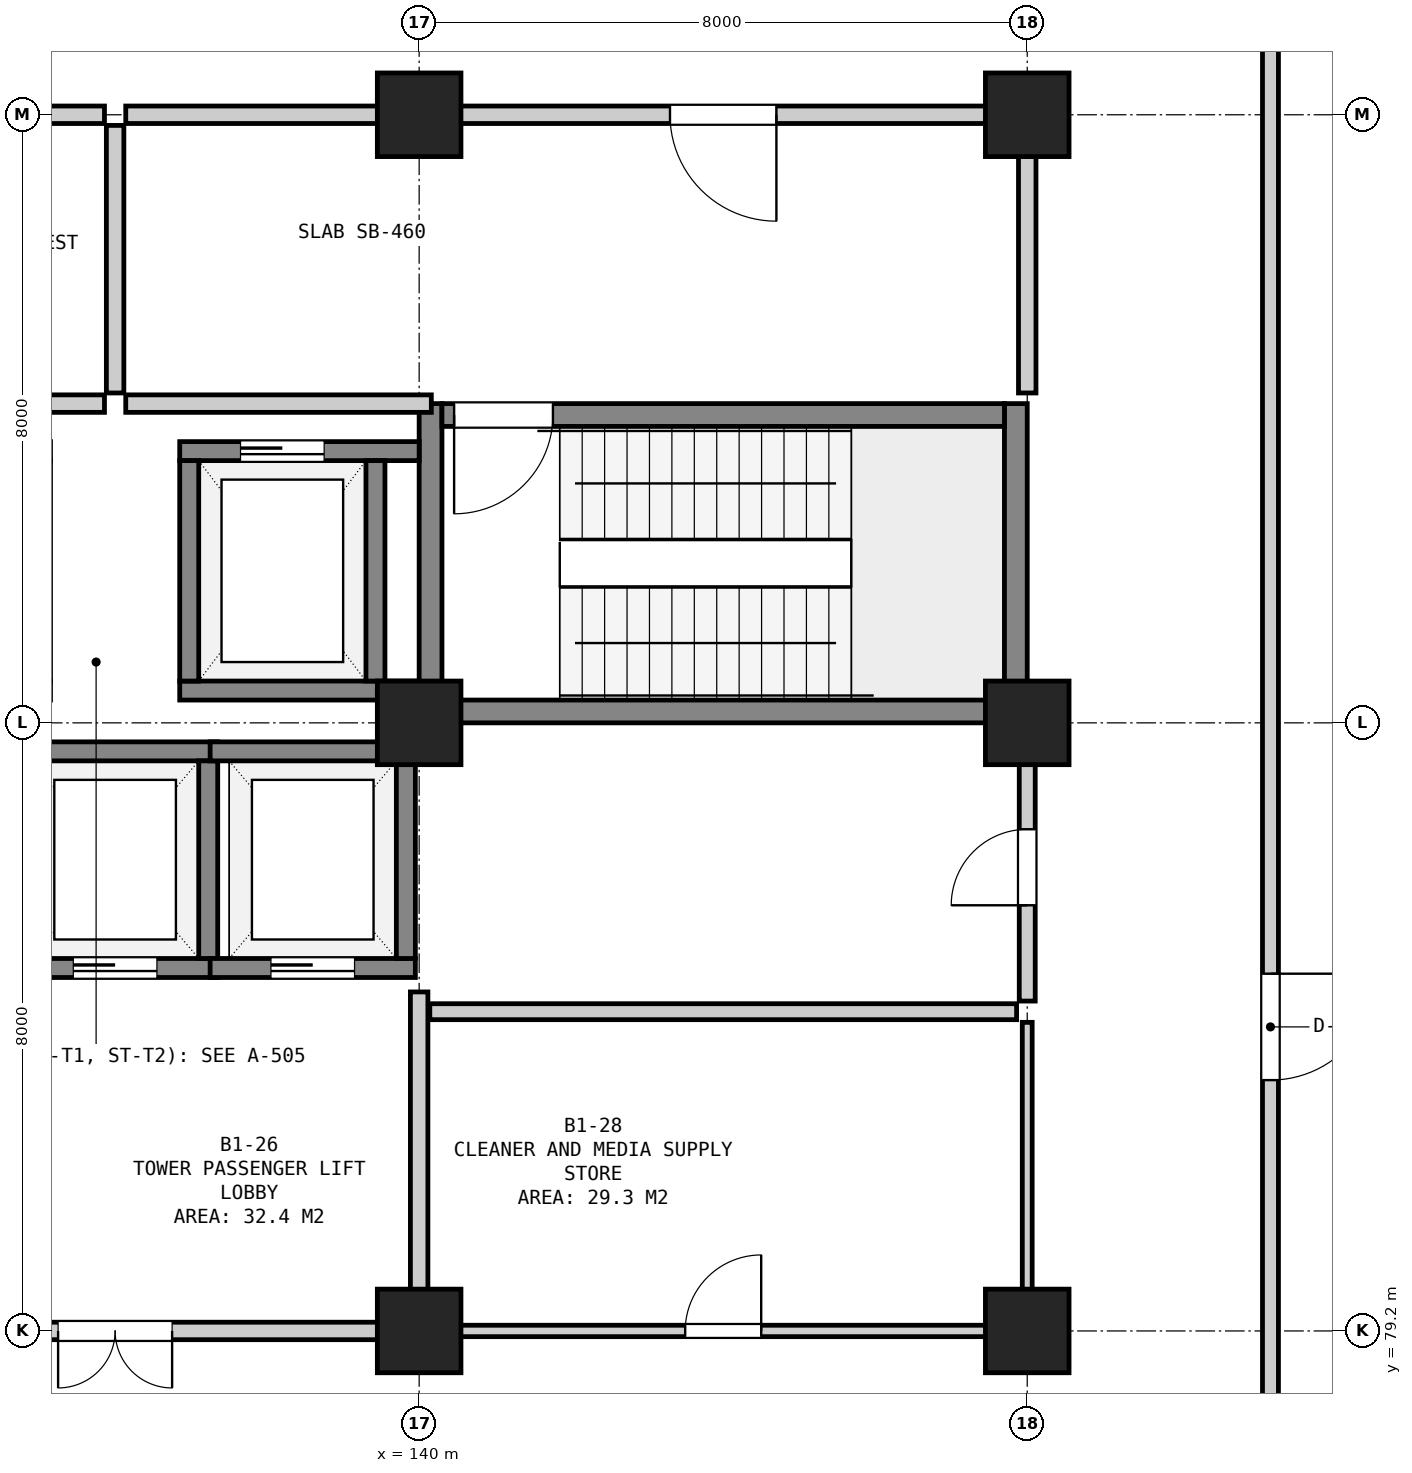
"""IFC4 building model, lengths in metres.
Left out: names, types, materials, properties, quantities, classifications, styles, units other than length and angle.
Written with IfcOpenShell. Run it as: python <this file> out.ifc"""

import sys

from ifc_helpers import new_model, si_unit, direction, frame, frame_2d, origin, origin_2d, place, context, subcontext, project, spatial, rectangle, extrude, element, fill, save


model = new_model("IFC4")
c1 = context("Model", 3, precision=1e-05, world=origin(), true_north=direction((0.0, 1.0)))
c2 = subcontext(c1, "Body", "Model", "MODEL_VIEW")
j1 = project(units=[si_unit("LENGTHUNIT", "METRE"), si_unit("PLANEANGLEUNIT", "RADIAN")], contexts=[c1])
p1 = place(None, origin())
s1 = spatial("IfcSite", under=j1, at=p1, CompositionType="ELEMENT")
p2 = place(p1, origin())
s2 = spatial("IfcBuilding", under=s1, at=p2, CompositionType="ELEMENT")
p3 = place(p2, frame((0.0, 0.0, -4.5)))
s3 = spatial("IfcBuildingStorey", under=s2, at=p3, CompositionType="ELEMENT", Elevation=-4.5)
for number, where, z_axis, x_axis in (
    (1, (140.0, 79.2, 0.0), (0.0, 0.0, 1.0), (1.0, 0.0, 0.0)),
    (2, (140.0, 87.2, 0.0), (0.0, 0.0, 1.0), (1.0, 0.0, 0.0)),
    (3, (140.0, 95.2, 0.0), (0.0, 0.0, 1.0), (1.0, 0.0, 0.0)),
    (4, (148.0, 79.2, 0.0), (0.0, 0.0, 1.0), (1.0, 0.0, 0.0)),
    (5, (148.0, 87.2, 0.0), (0.0, 0.0, 1.0), (1.0, 0.0, 0.0)),
    (6, (148.0, 95.2, 0.0), (0.0, 0.0, 1.0), (1.0, 0.0, 0.0)),
):
    element("IfcColumn", number, at=place(p3, frame(where, z_axis=z_axis, x_axis=x_axis)), inside=s3, PredefinedType="COLUMN", context=c2, shape_type="SweptSolid", body=[
        extrude(rectangle(XDim=1.1, YDim=1.1, at=origin_2d()), origin(), (0.0, 0.0, 1.0), 4.5),
    ])
for number, where, z_axis, x_axis in (
    (7, (140.15, 87.2, 0.0), (0.0, 0.0, 1.0), (0.0, 1.0, 0.0)),
    (8, (147.85, 87.2, 0.0), (0.0, 0.0, 1.0), (0.0, 1.0, 0.0)),
):
    element("IfcWall", number, at=place(p3, frame(where, z_axis=z_axis, x_axis=x_axis)), inside=s3, PredefinedType="SHEAR", context=c2, shape_type="SweptSolid", body=[
        extrude(rectangle(XDim=4.2, YDim=0.3, at=frame_2d((2.1, 0.0))), origin(), (0.0, 0.0, 1.0), 4.08),
    ])
p4 = place(p3, frame((140.3, 87.35, 0.0), z_axis=(0.0, 0.0, 1.0), x_axis=(1.0, 0.0, 0.0)))
e9 = element("IfcWall", 9, at=p4, inside=s3, PredefinedType="SHEAR", context=c2, shape_type="SweptSolid", body=[
    extrude(rectangle(XDim=7.4, YDim=0.3, at=frame_2d((3.7, 0.0))), origin(), (0.0, 0.0, 1.0), 4.08),
])
p5 = place(p3, frame((140.3, 91.25, 0.0), z_axis=(0.0, 0.0, 1.0), x_axis=(1.0, 0.0, 0.0)))
e10 = element("IfcWall", 10, at=p5, inside=s3, PredefinedType="SHEAR", context=c2, shape_type="SweptSolid", body=[
    extrude(rectangle(XDim=7.4, YDim=0.3, at=frame_2d((3.7, 0.0))), origin(), (0.0, 0.0, 1.0), 4.08),
])
p6 = place(p5, frame((0.16, 0.0, 0.0)))
e11 = element("IfcOpeningElement", 11, at=p6, cuts=e10, PredefinedType="OPENING", context=c2, shape_type="SweptSolid", body=[
    extrude(rectangle(XDim=1.3, YDim=2.18, at=frame_2d((0.65, 1.09))), frame((0.0, 0.162, 0.0), z_axis=(0.0, -1.0, 0.0), x_axis=(1.0, 0.0, 0.0)), (0.0, 0.0, 1.0), 0.324),
])
p7 = place(p3, frame((136.85, 87.625, 0.0), z_axis=(0.0, 0.0, 1.0), x_axis=(1.0, 0.0, 0.0)))
e12 = element("IfcWall", 12, at=p7, inside=s3, PredefinedType="SHEAR", context=c2, shape_type="SweptSolid", body=[
    extrude(rectangle(XDim=3.15, YDim=0.25, at=frame_2d((1.575, 0.0))), origin(), (0.0, 0.0, 1.0), 4.08),
])
p8 = place(p3, frame((136.85, 90.775, 0.0), z_axis=(0.0, 0.0, 1.0), x_axis=(1.0, 0.0, 0.0)))
e13 = element("IfcWall", 13, at=p8, inside=s3, PredefinedType="SHEAR", context=c2, shape_type="SweptSolid", body=[
    extrude(rectangle(XDim=3.15, YDim=0.25, at=frame_2d((1.575, 0.0))), origin(), (0.0, 0.0, 1.0), 4.08),
])
p9 = place(p8, frame((0.8, 0.0, 0.0)))
e14 = element("IfcOpeningElement", 14, at=p9, cuts=e13, PredefinedType="OPENING", context=c2, shape_type="SweptSolid", body=[
    extrude(rectangle(XDim=1.1, YDim=2.15, at=frame_2d((0.55, 1.075))), frame((0.0, 0.137, 0.0), z_axis=(0.0, -1.0, 0.0), x_axis=(1.0, 0.0, 0.0)), (0.0, 0.0, 1.0), 0.274),
])
for number, where, z_axis, x_axis in (
    (15, (136.975, 87.75, 0.0), (0.0, 0.0, 1.0), (0.0, 1.0, 0.0)),
    (16, (139.425, 87.75, 0.0), (0.0, 0.0, 1.0), (0.0, 1.0, 0.0)),
):
    element("IfcWall", number, at=place(p3, frame(where, z_axis=z_axis, x_axis=x_axis)), inside=s3, PredefinedType="SHEAR", context=c2, shape_type="SweptSolid", body=[
        extrude(rectangle(XDim=2.9, YDim=0.25, at=frame_2d((1.45, 0.0))), origin(), (0.0, 0.0, 1.0), 4.08),
    ])
p10 = place(p3, frame((134.65, 83.975, 0.0), z_axis=(0.0, 0.0, 1.0), x_axis=(1.0, 0.0, 0.0)))
e17 = element("IfcWall", 17, at=p10, inside=s3, PredefinedType="SHEAR", context=c2, shape_type="SweptSolid", body=[
    extrude(rectangle(XDim=2.7, YDim=0.25, at=frame_2d((1.35, 0.0))), origin(), (0.0, 0.0, 1.0), 4.08),
])
p11 = place(p10, frame((0.8, 0.0, 0.0)))
e18 = element("IfcOpeningElement", 18, at=p11, cuts=e17, PredefinedType="OPENING", context=c2, shape_type="SweptSolid", body=[
    extrude(rectangle(XDim=1.1, YDim=2.15, at=frame_2d((0.55, 1.075))), frame((0.0, 0.137, 0.0), z_axis=(0.0, -1.0, 0.0), x_axis=(1.0, 0.0, 0.0)), (0.0, 0.0, 1.0), 0.274),
])
p12 = place(p3, frame((134.65, 86.825, 0.0), z_axis=(0.0, 0.0, 1.0), x_axis=(1.0, 0.0, 0.0)))
e19 = element("IfcWall", 19, at=p12, inside=s3, PredefinedType="SHEAR", context=c2, shape_type="SweptSolid", body=[
    extrude(rectangle(XDim=2.7, YDim=0.25, at=frame_2d((1.35, 0.0))), origin(), (0.0, 0.0, 1.0), 4.08),
])
p13 = place(p3, frame((137.225, 84.1, 0.0), z_axis=(0.0, 0.0, 1.0), x_axis=(0.0, 1.0, 0.0)))
e20 = element("IfcWall", 20, at=p13, inside=s3, PredefinedType="SHEAR", context=c2, shape_type="SweptSolid", body=[
    extrude(rectangle(XDim=2.6, YDim=0.25, at=frame_2d((1.3, 0.0))), origin(), (0.0, 0.0, 1.0), 4.08),
])
p14 = place(p3, frame((137.25, 83.975, 0.0), z_axis=(0.0, 0.0, 1.0), x_axis=(1.0, 0.0, 0.0)))
e21 = element("IfcWall", 21, at=p14, inside=s3, PredefinedType="SHEAR", context=c2, shape_type="SweptSolid", body=[
    extrude(rectangle(XDim=2.7, YDim=0.25, at=frame_2d((1.35, 0.0))), origin(), (0.0, 0.0, 1.0), 4.08),
])
p15 = place(p14, frame((0.8, 0.0, 0.0)))
e22 = element("IfcOpeningElement", 22, at=p15, cuts=e21, PredefinedType="OPENING", context=c2, shape_type="SweptSolid", body=[
    extrude(rectangle(XDim=1.1, YDim=2.15, at=frame_2d((0.55, 1.075))), frame((0.0, 0.137, 0.0), z_axis=(0.0, -1.0, 0.0), x_axis=(1.0, 0.0, 0.0)), (0.0, 0.0, 1.0), 0.274),
])
p16 = place(p3, frame((137.25, 86.825, 0.0), z_axis=(0.0, 0.0, 1.0), x_axis=(1.0, 0.0, 0.0)))
e23 = element("IfcWall", 23, at=p16, inside=s3, PredefinedType="SHEAR", context=c2, shape_type="SweptSolid", body=[
    extrude(rectangle(XDim=2.7, YDim=0.25, at=frame_2d((1.35, 0.0))), origin(), (0.0, 0.0, 1.0), 4.08),
])
p17 = place(p3, frame((139.825, 84.1, 0.0), z_axis=(0.0, 0.0, 1.0), x_axis=(0.0, 1.0, 0.0)))
e24 = element("IfcWall", 24, at=p17, inside=s3, PredefinedType="SHEAR", context=c2, shape_type="SweptSolid", body=[
    extrude(rectangle(XDim=2.6, YDim=0.25, at=frame_2d((1.3, 0.0))), origin(), (0.0, 0.0, 1.0), 4.08),
])
p18 = place(p3, frame((131.84, 91.4, 0.0), z_axis=(0.0, 0.0, 1.0), x_axis=(1.0, 0.0, 0.0)))
e25 = element("IfcWall", 25, at=p18, inside=s3, PredefinedType="SOLIDWALL", context=c2, shape_type="SweptSolid", body=[
    extrude(rectangle(XDim=4.02, YDim=0.23, at=frame_2d((2.01, 0.0))), origin(), (0.0, 0.0, 1.0), 4.08),
])
p19 = place(p3, frame((124.14, 95.2, 0.0), z_axis=(0.0, 0.0, 1.0), x_axis=(1.0, 0.0, 0.0)))
e26 = element("IfcWall", 26, at=p19, inside=s3, PredefinedType="SOLIDWALL", context=c2, shape_type="SweptSolid", body=[
    extrude(rectangle(XDim=11.72, YDim=0.23, at=frame_2d((5.86, 0.0))), origin(), (0.0, 0.0, 1.0), 3.475),
])
p20 = place(p19, frame((3.16, 0.0, 0.0)))
e27 = element("IfcOpeningElement", 27, at=p20, cuts=e26, PredefinedType="OPENING", context=c2, shape_type="SweptSolid", body=[
    extrude(rectangle(XDim=1.4, YDim=2.2, at=frame_2d((0.7, 1.1))), frame((0.0, 0.127, 0.0), z_axis=(0.0, -1.0, 0.0), x_axis=(1.0, 0.0, 0.0)), (0.0, 0.0, 1.0), 0.254),
])
p21 = place(p3, frame((136.0, 91.54, 0.0), z_axis=(0.0, 0.0, 1.0), x_axis=(0.0, 1.0, 0.0)))
e28 = element("IfcWall", 28, at=p21, inside=s3, PredefinedType="SOLIDWALL", context=c2, shape_type="SweptSolid", body=[
    extrude(rectangle(XDim=3.52, YDim=0.23, at=frame_2d((1.76, 0.0))), origin(), (0.0, 0.0, 1.0), 4.08),
])
p22 = place(p3, frame((136.14, 91.4, 0.0), z_axis=(0.0, 0.0, 1.0), x_axis=(1.0, 0.0, 0.0)))
e29 = element("IfcWall", 29, at=p22, inside=s3, PredefinedType="SOLIDWALL", context=c2, shape_type="SweptSolid", body=[
    extrude(rectangle(XDim=4.02, YDim=0.23, at=frame_2d((2.01, 0.0))), origin(), (0.0, 0.0, 1.0), 4.08),
])
p23 = place(p3, frame((136.14, 95.2, 0.0), z_axis=(0.0, 0.0, 1.0), x_axis=(1.0, 0.0, 0.0)))
e30 = element("IfcWall", 30, at=p23, inside=s3, PredefinedType="SOLIDWALL", context=c2, shape_type="SweptSolid", body=[
    extrude(rectangle(XDim=11.72, YDim=0.23, at=frame_2d((5.86, 0.0))), origin(), (0.0, 0.0, 1.0), 3.475),
])
p24 = place(p23, frame((7.16, 0.0, 0.0)))
e31 = element("IfcOpeningElement", 31, at=p24, cuts=e30, PredefinedType="OPENING", context=c2, shape_type="SweptSolid", body=[
    extrude(rectangle(XDim=1.4, YDim=2.2, at=frame_2d((0.7, 1.1))), frame((0.0, 0.127, 0.0), z_axis=(0.0, -1.0, 0.0), x_axis=(1.0, 0.0, 0.0)), (0.0, 0.0, 1.0), 0.254),
])
p25 = place(p3, frame((148.0, 91.54, 0.0), z_axis=(0.0, 0.0, 1.0), x_axis=(0.0, 1.0, 0.0)))
e32 = element("IfcWall", 32, at=p25, inside=s3, PredefinedType="SOLIDWALL", context=c2, shape_type="SweptSolid", body=[
    extrude(rectangle(XDim=3.52, YDim=0.23, at=frame_2d((1.76, 0.0))), origin(), (0.0, 0.0, 1.0), 3.475),
])
p26 = place(p3, frame((132.14, 79.2, 0.0), z_axis=(0.0, 0.0, 1.0), x_axis=(1.0, 0.0, 0.0)))
e33 = element("IfcWall", 33, at=p26, inside=s3, PredefinedType="SOLIDWALL", context=c2, shape_type="SweptSolid", body=[
    extrude(rectangle(XDim=7.72, YDim=0.23, at=frame_2d((3.86, 0.0))), origin(), (0.0, 0.0, 1.0), 3.275),
])
p27 = place(p26, frame((3.11, 0.0, 0.0)))
e34 = element("IfcOpeningElement", 34, at=p27, cuts=e33, PredefinedType="OPENING", context=c2, shape_type="SweptSolid", body=[
    extrude(rectangle(XDim=1.5, YDim=2.2, at=frame_2d((0.75, 1.1))), frame((0.0, 0.127, 0.0), z_axis=(0.0, -1.0, 0.0), x_axis=(1.0, 0.0, 0.0)), (0.0, 0.0, 1.0), 0.254),
])
p28 = place(p3, frame((140.0, 79.34, 0.0), z_axis=(0.0, 0.0, 1.0), x_axis=(0.0, 1.0, 0.0)))
e35 = element("IfcWall", 35, at=p28, inside=s3, PredefinedType="SOLIDWALL", context=c2, shape_type="SweptSolid", body=[
    extrude(rectangle(XDim=4.32, YDim=0.23, at=frame_2d((2.16, 0.0))), origin(), (0.0, 0.0, 1.0), 3.425),
])
p29 = place(p3, frame((140.14, 83.4, 0.0), z_axis=(0.0, 0.0, 1.0), x_axis=(1.0, 0.0, 0.0)))
e36 = element("IfcWall", 36, at=p29, inside=s3, PredefinedType="SOLIDWALL", context=c2, shape_type="SweptSolid", body=[
    extrude(rectangle(XDim=7.72, YDim=0.21, at=frame_2d((3.86, 0.0))), origin(), (0.0, 0.0, 1.0), 4.08),
])
p30 = place(p3, frame((148.0, 83.54, 0.0), z_axis=(0.0, 0.0, 1.0), x_axis=(0.0, 1.0, 0.0)))
e37 = element("IfcWall", 37, at=p30, inside=s3, PredefinedType="SOLIDWALL", context=c2, shape_type="SweptSolid", body=[
    extrude(rectangle(XDim=3.52, YDim=0.21, at=frame_2d((1.76, 0.0))), origin(), (0.0, 0.0, 1.0), 3.475),
])
p31 = place(p30, frame((1.26, 0.0, 0.0)))
e38 = element("IfcOpeningElement", 38, at=p31, cuts=e37, PredefinedType="OPENING", context=c2, shape_type="SweptSolid", body=[
    extrude(rectangle(XDim=1.0, YDim=2.15, at=frame_2d((0.5, 1.075))), frame((0.0, 0.117, 0.0), z_axis=(0.0, -1.0, 0.0), x_axis=(1.0, 0.0, 0.0)), (0.0, 0.0, 1.0), 0.234),
])
p32 = place(p3, frame((140.14, 79.2, 0.0), z_axis=(0.0, 0.0, 1.0), x_axis=(1.0, 0.0, 0.0)))
e39 = element("IfcWall", 39, at=p32, inside=s3, PredefinedType="PARTITIONING", context=c2, shape_type="SweptSolid", body=[
    extrude(rectangle(XDim=7.72, YDim=0.15, at=frame_2d((3.86, 0.0))), origin(), (0.0, 0.0, 1.0), 3.325),
])
p33 = place(p32, frame((3.36, 0.0, 0.0)))
e40 = element("IfcOpeningElement", 40, at=p33, cuts=e39, PredefinedType="OPENING", context=c2, shape_type="SweptSolid", body=[
    extrude(rectangle(XDim=1.0, YDim=2.15, at=frame_2d((0.5, 1.075))), frame((0.0, 0.087, 0.0), z_axis=(0.0, -1.0, 0.0), x_axis=(1.0, 0.0, 0.0)), (0.0, 0.0, 1.0), 0.174),
])
p34 = place(p3, frame((148.0, 79.34, 0.0), z_axis=(0.0, 0.0, 1.0), x_axis=(0.0, 1.0, 0.0)))
e41 = element("IfcWall", 41, at=p34, inside=s3, PredefinedType="PARTITIONING", context=c2, shape_type="SweptSolid", body=[
    extrude(rectangle(XDim=3.92, YDim=0.13, at=frame_2d((1.96, 0.0))), origin(), (0.0, 0.0, 1.0), 3.475),
])
p35 = place(p3, frame((151.2, 65.74, 0.0), z_axis=(0.0, 0.0, 1.0), x_axis=(0.0, 1.0, 0.0)))
e42 = element("IfcWall", 42, at=p35, inside=s3, PredefinedType="SOLIDWALL", context=c2, shape_type="SweptSolid", body=[
    extrude(rectangle(XDim=32.52, YDim=0.21, at=frame_2d((16.26, 0.0))), origin(), (0.0, 0.0, 1.0), 4.08),
])
p36 = place(p35, frame((16.76, 0.0, 0.0)))
e43 = element("IfcOpeningElement", 43, at=p36, cuts=e42, PredefinedType="OPENING", context=c2, shape_type="SweptSolid", body=[
    extrude(rectangle(XDim=1.4, YDim=2.2, at=frame_2d((0.7, 1.1))), frame((0.0, 0.117, 0.0), z_axis=(0.0, -1.0, 0.0), x_axis=(1.0, 0.0, 0.0)), (0.0, 0.0, 1.0), 0.234),
])
p37 = place(p6, frame((1.3, 0.0, 0.0), z_axis=(0.0, 0.0, 1.0), x_axis=(-1.0, 0.0, 0.0)))
e44 = element("IfcDoor", 44, at=p37, inside=s3, OperationType="SINGLE_SWING_RIGHT", PredefinedType="DOOR", context=c2, shape_type="SweptSolid", body=[
    extrude(rectangle(XDim=1.3, YDim=2.18, at=frame_2d((0.65, 1.09))), frame((0.0, 0.025, 0.0), z_axis=(0.0, -1.0, 0.0), x_axis=(1.0, 0.0, 0.0)), (0.0, 0.0, 1.0), 0.05),
])
fill(e11, e44)
p38 = place(p9, origin())
e45 = element("IfcDoor", 45, at=p38, inside=s3, OperationType="SLIDING_TO_LEFT", PredefinedType="DOOR", context=c2, shape_type="SweptSolid", body=[
    extrude(rectangle(XDim=1.1, YDim=2.15, at=frame_2d((0.55, 1.075))), frame((0.0, 0.025, 0.0), z_axis=(0.0, -1.0, 0.0), x_axis=(1.0, 0.0, 0.0)), (0.0, 0.0, 1.0), 0.05),
])
fill(e14, e45)
p39 = place(p11, origin())
e46 = element("IfcDoor", 46, at=p39, inside=s3, OperationType="SLIDING_TO_LEFT", PredefinedType="DOOR", context=c2, shape_type="SweptSolid", body=[
    extrude(rectangle(XDim=1.1, YDim=2.15, at=frame_2d((0.55, 1.075))), frame((0.0, 0.025, 0.0), z_axis=(0.0, -1.0, 0.0), x_axis=(1.0, 0.0, 0.0)), (0.0, 0.0, 1.0), 0.05),
])
fill(e18, e46)
p40 = place(p15, origin())
e47 = element("IfcDoor", 47, at=p40, inside=s3, OperationType="SLIDING_TO_LEFT", PredefinedType="DOOR", context=c2, shape_type="SweptSolid", body=[
    extrude(rectangle(XDim=1.1, YDim=2.15, at=frame_2d((0.55, 1.075))), frame((0.0, 0.025, 0.0), z_axis=(0.0, -1.0, 0.0), x_axis=(1.0, 0.0, 0.0)), (0.0, 0.0, 1.0), 0.05),
])
fill(e22, e47)
p41 = place(p24, frame((1.4, 0.0, 0.0), z_axis=(0.0, 0.0, 1.0), x_axis=(-1.0, 0.0, 0.0)))
e48 = element("IfcDoor", 48, at=p41, inside=s3, OperationType="SINGLE_SWING_LEFT", PredefinedType="DOOR", context=c2, shape_type="SweptSolid", body=[
    extrude(rectangle(XDim=1.4, YDim=2.2, at=frame_2d((0.7, 1.1))), frame((0.0, 0.025, 0.0), z_axis=(0.0, -1.0, 0.0), x_axis=(1.0, 0.0, 0.0)), (0.0, 0.0, 1.0), 0.05),
])
fill(e31, e48)
p42 = place(p27, frame((1.5, 0.0, 0.0), z_axis=(0.0, 0.0, 1.0), x_axis=(-1.0, 0.0, 0.0)))
e49 = element("IfcDoor", 49, at=p42, inside=s3, OperationType="DOUBLE_DOOR_SINGLE_SWING", PredefinedType="DOOR", context=c2, shape_type="SweptSolid", body=[
    extrude(rectangle(XDim=1.5, YDim=2.2, at=frame_2d((0.75, 1.1))), frame((0.0, 0.025, 0.0), z_axis=(0.0, -1.0, 0.0), x_axis=(1.0, 0.0, 0.0)), (0.0, 0.0, 1.0), 0.05),
])
fill(e34, e49)
p43 = place(p31, origin())
e50 = element("IfcDoor", 50, at=p43, inside=s3, OperationType="SINGLE_SWING_LEFT", PredefinedType="DOOR", context=c2, shape_type="SweptSolid", body=[
    extrude(rectangle(XDim=1.0, YDim=2.15, at=frame_2d((0.5, 1.075))), frame((0.0, 0.025, 0.0), z_axis=(0.0, -1.0, 0.0), x_axis=(1.0, 0.0, 0.0)), (0.0, 0.0, 1.0), 0.05),
])
fill(e38, e50)
p44 = place(p33, origin())
e51 = element("IfcDoor", 51, at=p44, inside=s3, OperationType="SINGLE_SWING_RIGHT", PredefinedType="DOOR", context=c2, shape_type="SweptSolid", body=[
    extrude(rectangle(XDim=1.0, YDim=2.15, at=frame_2d((0.5, 1.075))), frame((0.0, 0.025, 0.0), z_axis=(0.0, -1.0, 0.0), x_axis=(1.0, 0.0, 0.0)), (0.0, 0.0, 1.0), 0.05),
])
fill(e40, e51)
p45 = place(p36, frame((1.4, 0.0, 0.0), z_axis=(0.0, 0.0, 1.0), x_axis=(-1.0, 0.0, 0.0)))
e52 = element("IfcDoor", 52, at=p45, inside=s3, OperationType="SINGLE_SWING_LEFT", PredefinedType="DOOR", context=c2, shape_type="SweptSolid", body=[
    extrude(rectangle(XDim=1.4, YDim=2.2, at=frame_2d((0.7, 1.1))), frame((0.0, 0.025, 0.0), z_axis=(0.0, -1.0, 0.0), x_axis=(1.0, 0.0, 0.0)), (0.0, 0.0, 1.0), 0.05),
])
fill(e43, e52)
save(model, sys.argv[1])
